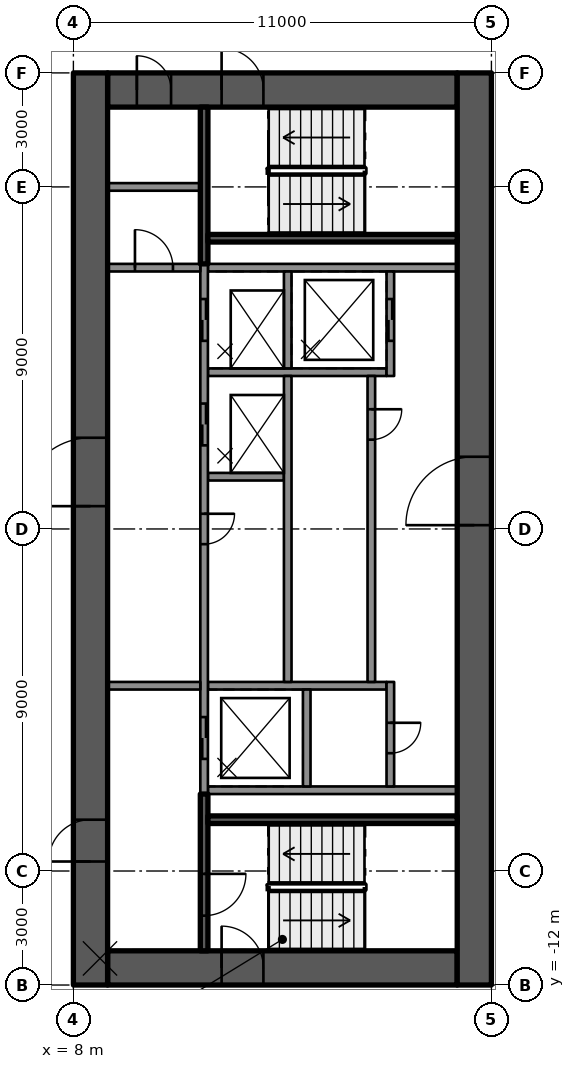
"""IFC4 building model, lengths in metres.
Left out: names, types, materials, properties, quantities, classifications, styles, units other than length and angle.
Written with IfcOpenShell. Run it as: python <this file> out.ifc"""

import sys

from ifc_helpers import new_model, si_unit, direction, frame, frame_2d, origin, place, context, subcontext, project, spatial, rectangle, extrude, element, fill, save


model = new_model("IFC4")
c1 = context("Model", 3, precision=1e-05, world=origin(), true_north=direction((0.0, 1.0)))
c2 = subcontext(c1, "Body", "Model", "MODEL_VIEW")
j1 = project(units=[si_unit("LENGTHUNIT", "METRE"), si_unit("PLANEANGLEUNIT", "RADIAN")], contexts=[c1])
p1 = place(None, origin())
s1 = spatial("IfcSite", under=j1, at=p1, CompositionType="ELEMENT")
p2 = place(p1, origin())
s2 = spatial("IfcBuilding", under=s1, at=p2, CompositionType="ELEMENT")
p3 = place(p2, frame((0.0, 0.0, 282.4)))
s3 = spatial("IfcBuildingStorey", under=s2, at=p3, CompositionType="ELEMENT", Elevation=282.4)
p4 = place(p3, frame((8.9, 11.55, 0.0), z_axis=(0.0, 0.0, 1.0), x_axis=(1.0, 0.0, 0.0)))
e1 = element("IfcWall", 1, at=p4, inside=s3, PredefinedType="SHEAR", context=c2, shape_type="SweptSolid", body=[
    extrude(rectangle(XDim=9.2, YDim=0.9, at=frame_2d((4.6, 0.0))), origin(), (0.0, 0.0, 1.0), 3.5),
])
p5 = place(p4, frame((3.0, 0.0, 0.0)))
e2 = element("IfcOpeningElement", 2, at=p5, cuts=e1, PredefinedType="OPENING", context=c2, shape_type="SweptSolid", body=[
    extrude(rectangle(XDim=1.1, YDim=2.1, at=frame_2d((0.55, 1.05))), frame((0.0, 0.46, 0.0), z_axis=(0.0, -1.0, 0.0), x_axis=(1.0, 0.0, 0.0)), (0.0, 0.0, 1.0), 0.92),
])
p6 = place(p4, frame((0.77, 0.0, 0.0)))
e3 = element("IfcOpeningElement", 3, at=p6, cuts=e1, PredefinedType="OPENING", context=c2, shape_type="SweptSolid", body=[
    extrude(rectangle(XDim=0.9, YDim=2.1, at=frame_2d((0.45, 1.05))), frame((0.0, 0.46, 0.0), z_axis=(0.0, -1.0, 0.0), x_axis=(1.0, 0.0, 0.0)), (0.0, 0.0, 1.0), 0.92),
])
p7 = place(p3, frame((8.9, -11.55, 0.0), z_axis=(0.0, 0.0, 1.0), x_axis=(1.0, 0.0, 0.0)))
e4 = element("IfcWall", 4, at=p7, inside=s3, PredefinedType="SHEAR", context=c2, shape_type="SweptSolid", body=[
    extrude(rectangle(XDim=9.2, YDim=0.9, at=frame_2d((4.6, 0.0))), origin(), (0.0, 0.0, 1.0), 3.5),
])
p8 = place(p7, frame((3.0, 0.0, 0.0)))
e5 = element("IfcOpeningElement", 5, at=p8, cuts=e4, PredefinedType="OPENING", context=c2, shape_type="SweptSolid", body=[
    extrude(rectangle(XDim=1.1, YDim=2.1, at=frame_2d((0.55, 1.05))), frame((0.0, 0.46, 0.0), z_axis=(0.0, -1.0, 0.0), x_axis=(1.0, 0.0, 0.0)), (0.0, 0.0, 1.0), 0.92),
])
p9 = place(p3, frame((8.45, -12.0, 0.0), z_axis=(0.0, 0.0, 1.0), x_axis=(0.0, 1.0, 0.0)))
e6 = element("IfcWall", 6, at=p9, inside=s3, PredefinedType="SHEAR", context=c2, shape_type="SweptSolid", body=[
    extrude(rectangle(XDim=24.0, YDim=0.9, at=frame_2d((12.0, 0.0))), origin(), (0.0, 0.0, 1.0), 3.5),
])
p10 = place(p9, frame((12.6, 0.0, 0.0)))
e7 = element("IfcOpeningElement", 7, at=p10, cuts=e6, PredefinedType="OPENING", context=c2, shape_type="SweptSolid", body=[
    extrude(rectangle(XDim=1.8, YDim=2.1, at=frame_2d((0.9, 1.05))), frame((0.0, 0.46, 0.0), z_axis=(0.0, -1.0, 0.0), x_axis=(1.0, 0.0, 0.0)), (0.0, 0.0, 1.0), 0.92),
])
p11 = place(p9, frame((3.25, 0.0, 0.0)))
e8 = element("IfcOpeningElement", 8, at=p11, cuts=e6, PredefinedType="OPENING", context=c2, shape_type="SweptSolid", body=[
    extrude(rectangle(XDim=1.1, YDim=2.1, at=frame_2d((0.55, 1.05))), frame((0.0, 0.46, 0.0), z_axis=(0.0, -1.0, 0.0), x_axis=(1.0, 0.0, 0.0)), (0.0, 0.0, 1.0), 0.92),
])
p12 = place(p3, frame((18.55, -12.0, 0.0), z_axis=(0.0, 0.0, 1.0), x_axis=(0.0, 1.0, 0.0)))
e9 = element("IfcWall", 9, at=p12, inside=s3, PredefinedType="SHEAR", context=c2, shape_type="SweptSolid", body=[
    extrude(rectangle(XDim=24.0, YDim=0.9, at=frame_2d((12.0, 0.0))), origin(), (0.0, 0.0, 1.0), 3.5),
])
p13 = place(p12, frame((12.1, 0.0, 0.0)))
e10 = element("IfcOpeningElement", 10, at=p13, cuts=e9, PredefinedType="OPENING", context=c2, shape_type="SweptSolid", body=[
    extrude(rectangle(XDim=1.8, YDim=2.1, at=frame_2d((0.9, 1.05))), frame((0.0, 0.46, 0.0), z_axis=(0.0, -1.0, 0.0), x_axis=(1.0, 0.0, 0.0)), (0.0, 0.0, 1.0), 0.92),
])
for number, where, z_axis, x_axis in (
    (11, (11.54, -6.875, 0.0), (0.0, 0.0, 1.0), (1.0, 0.0, 0.0)),
    (12, (11.54, 6.875, 0.0), (0.0, 0.0, 1.0), (1.0, 0.0, 0.0)),
):
    element("IfcWall", number, at=place(p3, frame(where, z_axis=z_axis, x_axis=x_axis)), inside=s3, PredefinedType="SOLIDWALL", context=c2, shape_type="SweptSolid", body=[
        extrude(rectangle(XDim=6.56, YDim=0.2, at=frame_2d((3.28, 0.0))), origin(), (0.0, 0.0, 1.0), 3.09),
    ])
p14 = place(p3, frame((11.54, 4.125, 0.0), z_axis=(0.0, 0.0, 1.0), x_axis=(1.0, 0.0, 0.0)))
e13 = element("IfcWall", 13, at=p14, inside=s3, PredefinedType="SOLIDWALL", context=c2, shape_type="SweptSolid", body=[
    extrude(rectangle(XDim=4.7, YDim=0.2, at=frame_2d((2.35, 0.0))), origin(), (0.0, 0.0, 1.0), 3.09),
])
p15 = place(p3, frame((11.54, 1.375, 0.0), z_axis=(0.0, 0.0, 1.0), x_axis=(1.0, 0.0, 0.0)))
e14 = element("IfcWall", 14, at=p15, inside=s3, PredefinedType="SOLIDWALL", context=c2, shape_type="SweptSolid", body=[
    extrude(rectangle(XDim=2.0, YDim=0.2, at=frame_2d((1.0, 0.0))), origin(), (0.0, 0.0, 1.0), 3.09),
])
p16 = place(p3, frame((11.54, -4.125, 0.0), z_axis=(0.0, 0.0, 1.0), x_axis=(1.0, 0.0, 0.0)))
e15 = element("IfcWall", 15, at=p16, inside=s3, PredefinedType="SOLIDWALL", context=c2, shape_type="SweptSolid", body=[
    extrude(rectangle(XDim=4.7, YDim=0.2, at=frame_2d((2.35, 0.0))), origin(), (0.0, 0.0, 1.0), 3.09),
])
p17 = place(p3, frame((11.44, 6.975, 0.0), z_axis=(0.0, 0.0, 1.0), x_axis=(0.0, -1.0, 0.0)))
e16 = element("IfcWall", 16, at=p17, inside=s3, PredefinedType="SOLIDWALL", context=c2, shape_type="SweptSolid", body=[
    extrude(rectangle(XDim=13.95, YDim=0.2, at=frame_2d((6.975, 0.0))), origin(), (0.0, 0.0, 1.0), 3.09),
])
p18 = place(p17, frame((0.925, 0.0, 0.0)))
e17 = element("IfcOpeningElement", 17, at=p18, cuts=e16, PredefinedType="OPENING", context=c2, shape_type="SweptSolid", body=[
    extrude(rectangle(XDim=1.1, YDim=2.1, at=frame_2d((0.55, 1.05))), frame((0.0, 0.11, 0.0), z_axis=(0.0, -1.0, 0.0), x_axis=(1.0, 0.0, 0.0)), (0.0, 0.0, 1.0), 0.22),
])
p19 = place(p17, frame((3.675, 0.0, 0.0)))
e18 = element("IfcOpeningElement", 18, at=p19, cuts=e16, PredefinedType="OPENING", context=c2, shape_type="SweptSolid", body=[
    extrude(rectangle(XDim=1.1, YDim=2.1, at=frame_2d((0.55, 1.05))), frame((0.0, 0.11, 0.0), z_axis=(0.0, -1.0, 0.0), x_axis=(1.0, 0.0, 0.0)), (0.0, 0.0, 1.0), 0.22),
])
p20 = place(p17, frame((11.925, 0.0, 0.0)))
e19 = element("IfcOpeningElement", 19, at=p20, cuts=e16, PredefinedType="OPENING", context=c2, shape_type="SweptSolid", body=[
    extrude(rectangle(XDim=1.1, YDim=2.1, at=frame_2d((0.55, 1.05))), frame((0.0, 0.11, 0.0), z_axis=(0.0, -1.0, 0.0), x_axis=(1.0, 0.0, 0.0)), (0.0, 0.0, 1.0), 0.22),
])
p21 = place(p17, frame((6.575, 0.0, 0.0)))
e20 = element("IfcOpeningElement", 20, at=p21, cuts=e16, PredefinedType="OPENING", context=c2, shape_type="SweptSolid", body=[
    extrude(rectangle(XDim=0.8, YDim=2.1, at=frame_2d((0.4, 1.05))), frame((0.0, 0.11, 0.0), z_axis=(0.0, -1.0, 0.0), x_axis=(1.0, 0.0, 0.0)), (0.0, 0.0, 1.0), 0.22),
])
p22 = place(p3, frame((13.64, 6.775, 0.0), z_axis=(0.0, 0.0, 1.0), x_axis=(0.0, -1.0, 0.0)))
e21 = element("IfcWall", 21, at=p22, inside=s3, PredefinedType="SOLIDWALL", context=c2, shape_type="SweptSolid", body=[
    extrude(rectangle(XDim=2.55, YDim=0.2, at=frame_2d((1.275, 0.0))), origin(), (0.0, 0.0, 1.0), 3.09),
])
p23 = place(p3, frame((13.64, 4.025, 0.0), z_axis=(0.0, 0.0, 1.0), x_axis=(0.0, -1.0, 0.0)))
e22 = element("IfcWall", 22, at=p23, inside=s3, PredefinedType="SOLIDWALL", context=c2, shape_type="SweptSolid", body=[
    extrude(rectangle(XDim=8.05, YDim=0.2, at=frame_2d((4.025, 0.0))), origin(), (0.0, 0.0, 1.0), 3.09),
])
p24 = place(p3, frame((14.14, -4.225, 0.0), z_axis=(0.0, 0.0, 1.0), x_axis=(0.0, -1.0, 0.0)))
e23 = element("IfcWall", 23, at=p24, inside=s3, PredefinedType="SOLIDWALL", context=c2, shape_type="SweptSolid", body=[
    extrude(rectangle(XDim=2.55, YDim=0.2, at=frame_2d((1.275, 0.0))), origin(), (0.0, 0.0, 1.0), 3.09),
])
p25 = place(p3, frame((16.34, 6.775, 0.0), z_axis=(0.0, 0.0, 1.0), x_axis=(0.0, -1.0, 0.0)))
e24 = element("IfcWall", 24, at=p25, inside=s3, PredefinedType="SOLIDWALL", context=c2, shape_type="SweptSolid", body=[
    extrude(rectangle(XDim=2.75, YDim=0.2, at=frame_2d((1.375, 0.0))), origin(), (0.0, 0.0, 1.0), 3.09),
])
p26 = place(p25, frame((0.725, 0.0, 0.0)))
e25 = element("IfcOpeningElement", 25, at=p26, cuts=e24, PredefinedType="OPENING", context=c2, shape_type="SweptSolid", body=[
    extrude(rectangle(XDim=1.1, YDim=2.1, at=frame_2d((0.55, 1.05))), frame((0.0, 0.11, 0.0), z_axis=(0.0, -1.0, 0.0), x_axis=(1.0, 0.0, 0.0)), (0.0, 0.0, 1.0), 0.22),
])
p27 = place(p3, frame((15.84, 4.025, 0.0), z_axis=(0.0, 0.0, 1.0), x_axis=(0.0, -1.0, 0.0)))
e26 = element("IfcWall", 26, at=p27, inside=s3, PredefinedType="SOLIDWALL", context=c2, shape_type="SweptSolid", body=[
    extrude(rectangle(XDim=8.05, YDim=0.2, at=frame_2d((4.025, 0.0))), origin(), (0.0, 0.0, 1.0), 3.09),
])
p28 = place(p27, frame((0.875, 0.0, 0.0)))
e27 = element("IfcOpeningElement", 27, at=p28, cuts=e26, PredefinedType="OPENING", context=c2, shape_type="SweptSolid", body=[
    extrude(rectangle(XDim=0.8, YDim=2.1, at=frame_2d((0.4, 1.05))), frame((0.0, 0.11, 0.0), z_axis=(0.0, -1.0, 0.0), x_axis=(1.0, 0.0, 0.0)), (0.0, 0.0, 1.0), 0.22),
])
p29 = place(p3, frame((16.34, -4.025, 0.0), z_axis=(0.0, 0.0, 1.0), x_axis=(0.0, -1.0, 0.0)))
e28 = element("IfcWall", 28, at=p29, inside=s3, PredefinedType="SOLIDWALL", context=c2, shape_type="SweptSolid", body=[
    extrude(rectangle(XDim=2.75, YDim=0.2, at=frame_2d((1.375, 0.0))), origin(), (0.0, 0.0, 1.0), 3.09),
])
p30 = place(p29, frame((1.075, 0.0, 0.0)))
e29 = element("IfcOpeningElement", 29, at=p30, cuts=e28, PredefinedType="OPENING", context=c2, shape_type="SweptSolid", body=[
    extrude(rectangle(XDim=0.8, YDim=2.1, at=frame_2d((0.4, 1.05))), frame((0.0, 0.11, 0.0), z_axis=(0.0, -1.0, 0.0), x_axis=(1.0, 0.0, 0.0)), (0.0, 0.0, 1.0), 0.22),
])
p31 = place(p3, frame((11.44, -6.975, 0.0), z_axis=(0.0, 0.0, 1.0), x_axis=(0.0, -1.0, 0.0)))
e30 = element("IfcWall", 30, at=p31, inside=s3, PredefinedType="SOLIDWALL", context=c2, shape_type="SweptSolid", body=[
    extrude(rectangle(XDim=4.125, YDim=0.2, at=frame_2d((2.062, 0.0))), origin(), (0.0, 0.0, 1.0), 3.09),
])
p32 = place(p31, frame((2.1, 0.0, 0.0)))
e31 = element("IfcOpeningElement", 31, at=p32, cuts=e30, PredefinedType="OPENING", context=c2, shape_type="SweptSolid", body=[
    extrude(rectangle(XDim=1.1, YDim=2.1, at=frame_2d((0.55, 1.05))), frame((0.0, 0.11, 0.0), z_axis=(0.0, -1.0, 0.0), x_axis=(1.0, 0.0, 0.0)), (0.0, 0.0, 1.0), 0.22),
])
p33 = place(p3, frame((11.54, -7.65, 0.0), z_axis=(0.0, 0.0, 1.0), x_axis=(1.0, 0.0, 0.0)))
e32 = element("IfcWall", 32, at=p33, inside=s3, PredefinedType="SOLIDWALL", context=c2, shape_type="SweptSolid", body=[
    extrude(rectangle(XDim=6.56, YDim=0.2, at=frame_2d((3.28, 0.0))), origin(), (0.0, 0.0, 1.0), 3.09),
])
p34 = place(p3, frame((11.44, 11.1, 0.0), z_axis=(0.0, 0.0, 1.0), x_axis=(0.0, -1.0, 0.0)))
e33 = element("IfcWall", 33, at=p34, inside=s3, PredefinedType="SOLIDWALL", context=c2, shape_type="SweptSolid", body=[
    extrude(rectangle(XDim=4.125, YDim=0.2, at=frame_2d((2.062, 0.0))), origin(), (0.0, 0.0, 1.0), 3.09),
])
p35 = place(p3, frame((11.54, 7.65, 0.0), z_axis=(0.0, 0.0, 1.0), x_axis=(1.0, 0.0, 0.0)))
e34 = element("IfcWall", 34, at=p35, inside=s3, PredefinedType="SOLIDWALL", context=c2, shape_type="SweptSolid", body=[
    extrude(rectangle(XDim=6.56, YDim=0.2, at=frame_2d((3.28, 0.0))), origin(), (0.0, 0.0, 1.0), 3.09),
])
p36 = place(p3, frame((8.9, -4.125, 0.0), z_axis=(0.0, 0.0, 1.0), x_axis=(1.0, 0.0, 0.0)))
e35 = element("IfcWall", 35, at=p36, inside=s3, PredefinedType="PARTITIONING", context=c2, shape_type="SweptSolid", body=[
    extrude(rectangle(XDim=2.44, YDim=0.2, at=frame_2d((1.22, 0.0))), origin(), (0.0, 0.0, 1.0), 3.09),
])
p37 = place(p3, frame((8.9, 6.875, 0.0), z_axis=(0.0, 0.0, 1.0), x_axis=(1.0, 0.0, 0.0)))
e36 = element("IfcWall", 36, at=p37, inside=s3, PredefinedType="PARTITIONING", context=c2, shape_type="SweptSolid", body=[
    extrude(rectangle(XDim=2.44, YDim=0.2, at=frame_2d((1.22, 0.0))), origin(), (0.0, 0.0, 1.0), 3.09),
])
p38 = place(p37, frame((0.72, 0.0, 0.0)))
e37 = element("IfcOpeningElement", 37, at=p38, cuts=e36, PredefinedType="OPENING", context=c2, shape_type="SweptSolid", body=[
    extrude(rectangle(XDim=1.0, YDim=2.1, at=frame_2d((0.5, 1.05))), frame((0.0, 0.11, 0.0), z_axis=(0.0, -1.0, 0.0), x_axis=(1.0, 0.0, 0.0)), (0.0, 0.0, 1.0), 0.22),
])
p39 = place(p3, frame((8.9, 9.0, 0.0), z_axis=(0.0, 0.0, 1.0), x_axis=(1.0, 0.0, 0.0)))
e38 = element("IfcWall", 38, at=p39, inside=s3, PredefinedType="PARTITIONING", context=c2, shape_type="SweptSolid", body=[
    extrude(rectangle(XDim=2.44, YDim=0.2, at=frame_2d((1.22, 0.0))), origin(), (0.0, 0.0, 1.0), 3.09),
])
p40 = place(p18, origin())
e39 = element("IfcDoor", 39, at=p40, inside=s3, OperationType="DOUBLE_DOOR_SLIDING", PredefinedType="DOOR", context=c2, shape_type="SweptSolid", body=[
    extrude(rectangle(XDim=1.1, YDim=2.1, at=frame_2d((0.55, 1.05))), frame((0.0, 0.025, 0.0), z_axis=(0.0, -1.0, 0.0), x_axis=(1.0, 0.0, 0.0)), (0.0, 0.0, 1.0), 0.05),
])
fill(e17, e39)
p41 = place(p26, origin())
e40 = element("IfcDoor", 40, at=p41, inside=s3, OperationType="DOUBLE_DOOR_SLIDING", PredefinedType="DOOR", context=c2, shape_type="SweptSolid", body=[
    extrude(rectangle(XDim=1.1, YDim=2.1, at=frame_2d((0.55, 1.05))), frame((0.0, 0.025, 0.0), z_axis=(0.0, -1.0, 0.0), x_axis=(1.0, 0.0, 0.0)), (0.0, 0.0, 1.0), 0.05),
])
fill(e25, e40)
p42 = place(p19, origin())
e41 = element("IfcDoor", 41, at=p42, inside=s3, OperationType="DOUBLE_DOOR_SLIDING", PredefinedType="DOOR", context=c2, shape_type="SweptSolid", body=[
    extrude(rectangle(XDim=1.1, YDim=2.1, at=frame_2d((0.55, 1.05))), frame((0.0, 0.025, 0.0), z_axis=(0.0, -1.0, 0.0), x_axis=(1.0, 0.0, 0.0)), (0.0, 0.0, 1.0), 0.05),
])
fill(e18, e41)
p43 = place(p20, origin())
e42 = element("IfcDoor", 42, at=p43, inside=s3, OperationType="DOUBLE_DOOR_SLIDING", PredefinedType="DOOR", context=c2, shape_type="SweptSolid", body=[
    extrude(rectangle(XDim=1.1, YDim=2.1, at=frame_2d((0.55, 1.05))), frame((0.0, 0.025, 0.0), z_axis=(0.0, -1.0, 0.0), x_axis=(1.0, 0.0, 0.0)), (0.0, 0.0, 1.0), 0.05),
])
fill(e19, e42)
p44 = place(p28, origin())
e43 = element("IfcDoor", 43, at=p44, inside=s3, OperationType="SINGLE_SWING_LEFT", PredefinedType="DOOR", context=c2, shape_type="SweptSolid", body=[
    extrude(rectangle(XDim=0.8, YDim=2.1, at=frame_2d((0.4, 1.05))), frame((0.0, 0.025, 0.0), z_axis=(0.0, -1.0, 0.0), x_axis=(1.0, 0.0, 0.0)), (0.0, 0.0, 1.0), 0.05),
])
fill(e27, e43)
p45 = place(p21, origin())
e44 = element("IfcDoor", 44, at=p45, inside=s3, OperationType="SINGLE_SWING_LEFT", PredefinedType="DOOR", context=c2, shape_type="SweptSolid", body=[
    extrude(rectangle(XDim=0.8, YDim=2.1, at=frame_2d((0.4, 1.05))), frame((0.0, 0.025, 0.0), z_axis=(0.0, -1.0, 0.0), x_axis=(1.0, 0.0, 0.0)), (0.0, 0.0, 1.0), 0.05),
])
fill(e20, e44)
p46 = place(p30, origin())
e45 = element("IfcDoor", 45, at=p46, inside=s3, OperationType="SINGLE_SWING_LEFT", PredefinedType="DOOR", context=c2, shape_type="SweptSolid", body=[
    extrude(rectangle(XDim=0.8, YDim=2.1, at=frame_2d((0.4, 1.05))), frame((0.0, 0.025, 0.0), z_axis=(0.0, -1.0, 0.0), x_axis=(1.0, 0.0, 0.0)), (0.0, 0.0, 1.0), 0.05),
])
fill(e29, e45)
p47 = place(p10, origin())
e46 = element("IfcDoor", 46, at=p47, inside=s3, OperationType="SINGLE_SWING_RIGHT", PredefinedType="DOOR", context=c2, shape_type="SweptSolid", body=[
    extrude(rectangle(XDim=1.8, YDim=2.1, at=frame_2d((0.9, 1.05))), frame((0.0, 0.025, 0.0), z_axis=(0.0, -1.0, 0.0), x_axis=(1.0, 0.0, 0.0)), (0.0, 0.0, 1.0), 0.05),
])
fill(e7, e46)
p48 = place(p13, origin())
e47 = element("IfcDoor", 47, at=p48, inside=s3, OperationType="SINGLE_SWING_RIGHT", PredefinedType="DOOR", context=c2, shape_type="SweptSolid", body=[
    extrude(rectangle(XDim=1.8, YDim=2.1, at=frame_2d((0.9, 1.05))), frame((0.0, 0.025, 0.0), z_axis=(0.0, -1.0, 0.0), x_axis=(1.0, 0.0, 0.0)), (0.0, 0.0, 1.0), 0.05),
])
fill(e10, e47)
p49 = place(p11, origin())
e48 = element("IfcDoor", 48, at=p49, inside=s3, OperationType="SINGLE_SWING_LEFT", PredefinedType="DOOR", context=c2, shape_type="SweptSolid", body=[
    extrude(rectangle(XDim=1.1, YDim=2.1, at=frame_2d((0.55, 1.05))), frame((0.0, 0.025, 0.0), z_axis=(0.0, -1.0, 0.0), x_axis=(1.0, 0.0, 0.0)), (0.0, 0.0, 1.0), 0.05),
])
fill(e8, e48)
p50 = place(p8, origin())
e49 = element("IfcDoor", 49, at=p50, inside=s3, OperationType="SINGLE_SWING_LEFT", PredefinedType="DOOR", context=c2, shape_type="SweptSolid", body=[
    extrude(rectangle(XDim=1.1, YDim=2.1, at=frame_2d((0.55, 1.05))), frame((0.0, 0.025, 0.0), z_axis=(0.0, -1.0, 0.0), x_axis=(1.0, 0.0, 0.0)), (0.0, 0.0, 1.0), 0.05),
])
fill(e5, e49)
p51 = place(p5, origin())
e50 = element("IfcDoor", 50, at=p51, inside=s3, OperationType="SINGLE_SWING_LEFT", PredefinedType="DOOR", context=c2, shape_type="SweptSolid", body=[
    extrude(rectangle(XDim=1.1, YDim=2.1, at=frame_2d((0.55, 1.05))), frame((0.0, 0.025, 0.0), z_axis=(0.0, -1.0, 0.0), x_axis=(1.0, 0.0, 0.0)), (0.0, 0.0, 1.0), 0.05),
])
fill(e2, e50)
p52 = place(p32, origin())
e51 = element("IfcDoor", 51, at=p52, inside=s3, OperationType="SINGLE_SWING_RIGHT", PredefinedType="DOOR", context=c2, shape_type="SweptSolid", body=[
    extrude(rectangle(XDim=1.1, YDim=2.1, at=frame_2d((0.55, 1.05))), frame((0.0, 0.025, 0.0), z_axis=(0.0, -1.0, 0.0), x_axis=(1.0, 0.0, 0.0)), (0.0, 0.0, 1.0), 0.05),
])
fill(e31, e51)
p53 = place(p6, origin())
e52 = element("IfcDoor", 52, at=p53, inside=s3, OperationType="SINGLE_SWING_LEFT", PredefinedType="DOOR", context=c2, shape_type="SweptSolid", body=[
    extrude(rectangle(XDim=0.9, YDim=2.1, at=frame_2d((0.45, 1.05))), frame((0.0, 0.025, 0.0), z_axis=(0.0, -1.0, 0.0), x_axis=(1.0, 0.0, 0.0)), (0.0, 0.0, 1.0), 0.05),
])
fill(e3, e52)
p54 = place(p38, origin())
e53 = element("IfcDoor", 53, at=p54, inside=s3, OperationType="SINGLE_SWING_RIGHT", PredefinedType="DOOR", context=c2, shape_type="SweptSolid", body=[
    extrude(rectangle(XDim=1.0, YDim=2.1, at=frame_2d((0.5, 1.05))), frame((0.0, 0.025, 0.0), z_axis=(0.0, -1.0, 0.0), x_axis=(1.0, 0.0, 0.0)), (0.0, 0.0, 1.0), 0.05),
])
fill(e37, e53)
save(model, sys.argv[1])
